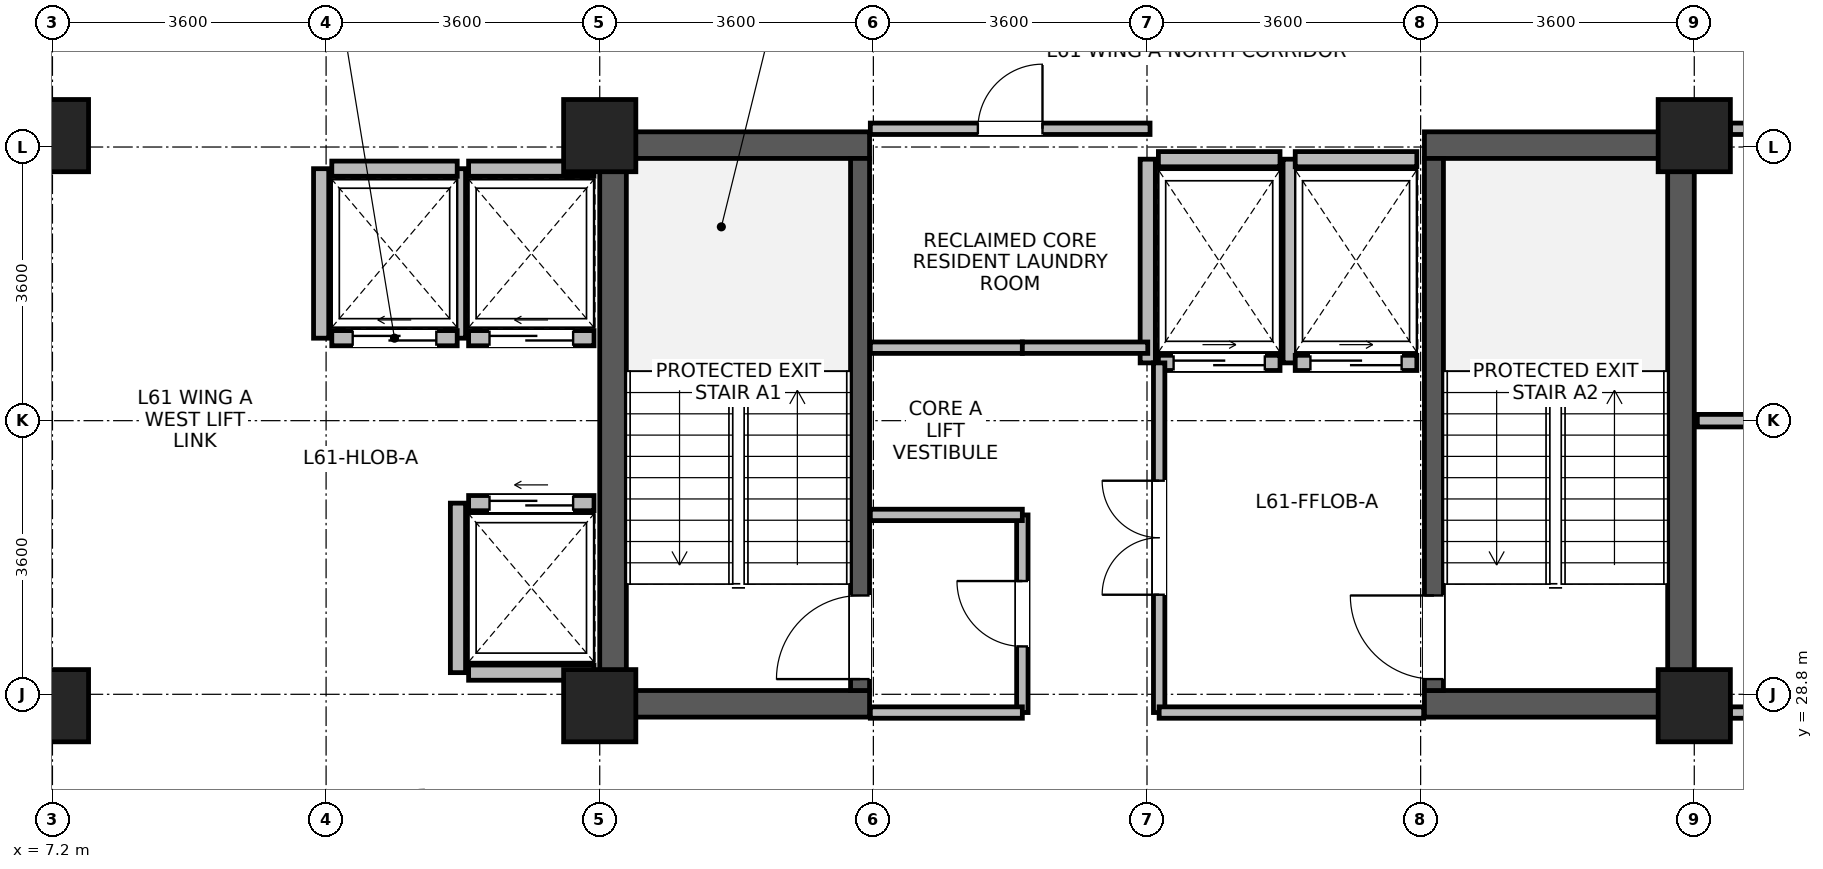
"""IFC4 building model, lengths in metres.
Left out: names, types, materials, properties, quantities, classifications, styles, units other than length and angle.
Written with IfcOpenShell. Run it as: python <this file> out.ifc"""

import sys

from ifc_helpers import new_model, si_unit, direction, frame, frame_2d, origin, origin_2d, place, context, subcontext, project, spatial, rectangle, extrude, source, transform, mapped, element, fill, save


model = new_model("IFC4")
c1 = context("Model", 3, precision=1e-05, world=origin(), true_north=direction((0.0, 1.0)))
c2 = subcontext(c1, "Body", "Model", "MODEL_VIEW")
j1 = project(units=[si_unit("LENGTHUNIT", "METRE"), si_unit("PLANEANGLEUNIT", "RADIAN")], contexts=[c1])
p1 = place(None, origin())
s1 = spatial("IfcSite", under=j1, at=p1, CompositionType="ELEMENT")
p2 = place(p1, origin())
s2 = spatial("IfcBuilding", under=s1, at=p2, CompositionType="ELEMENT")
p3 = place(p2, frame((0.0, 0.0, 238.8)))
s3 = spatial("IfcBuildingStorey", under=s2, at=p3, CompositionType="ELEMENT", Elevation=238.8)
for number, where, z_axis, x_axis in (
    (1, (14.575, 28.5, 0.0), (0.0, 0.0, 1.0), (0.0, 1.0, 0.0)),
    (2, (28.625, 28.5, 0.0), (0.0, 0.0, 1.0), (0.0, 1.0, 0.0)),
):
    element("IfcWall", number, at=place(p3, frame(where, z_axis=z_axis, x_axis=x_axis)), inside=s3, PredefinedType="SHEAR", context=c2, shape_type="SweptSolid", body=[
        extrude(rectangle(XDim=7.7, YDim=0.35, at=frame_2d((3.85, 0.0))), origin(), (0.0, 0.0, 1.0), 3.44),
    ])
for number, where, z_axis, x_axis in (
    (3, (14.75, 28.675, 0.0), (0.0, 0.0, 1.0), (1.0, 0.0, 0.0)),
    (4, (25.25, 28.675, 0.0), (0.0, 0.0, 1.0), (1.0, 0.0, 0.0)),
    (5, (14.75, 36.025, 0.0), (0.0, 0.0, 1.0), (1.0, 0.0, 0.0)),
    (6, (25.25, 36.025, 0.0), (0.0, 0.0, 1.0), (1.0, 0.0, 0.0)),
):
    element("IfcWall", number, at=place(p3, frame(where, z_axis=z_axis, x_axis=x_axis)), inside=s3, PredefinedType="SHEAR", context=c2, shape_type="SweptSolid", body=[
        extrude(rectangle(XDim=3.2, YDim=0.35, at=frame_2d((1.6, 0.0))), origin(), (0.0, 0.0, 1.0), 3.44),
    ])
p4 = place(p3, frame((17.825, 28.85, 0.0), z_axis=(0.0, 0.0, 1.0), x_axis=(0.0, 1.0, 0.0)))
e7 = element("IfcWall", 7, at=p4, inside=s3, PredefinedType="SHEAR", context=c2, shape_type="SweptSolid", body=[
    extrude(rectangle(XDim=7.0, YDim=0.25, at=frame_2d((3.5, 0.0))), origin(), (0.0, 0.0, 1.0), 3.44),
])
p5 = place(p4, frame((0.15, 0.0, 0.0)))
e8 = element("IfcOpeningElement", 8, at=p5, cuts=e7, PredefinedType="OPENING", context=c2, shape_type="SweptSolid", body=[
    extrude(rectangle(XDim=1.1, YDim=2.08, at=frame_2d((0.55, 1.04))), frame((0.0, 0.135, 0.0), z_axis=(0.0, -1.0, 0.0), x_axis=(1.0, 0.0, 0.0)), (0.0, 0.0, 1.0), 0.27),
])
p6 = place(p3, frame((25.375, 28.85, 0.0), z_axis=(0.0, 0.0, 1.0), x_axis=(0.0, 1.0, 0.0)))
e9 = element("IfcWall", 9, at=p6, inside=s3, PredefinedType="SHEAR", context=c2, shape_type="SweptSolid", body=[
    extrude(rectangle(XDim=7.0, YDim=0.25, at=frame_2d((3.5, 0.0))), origin(), (0.0, 0.0, 1.0), 3.44),
])
p7 = place(p6, frame((0.15, 0.0, 0.0)))
e10 = element("IfcOpeningElement", 10, at=p7, cuts=e9, PredefinedType="OPENING", context=c2, shape_type="SweptSolid", body=[
    extrude(rectangle(XDim=1.1, YDim=2.08, at=frame_2d((0.55, 1.04))), frame((0.0, 0.135, 0.0), z_axis=(0.0, -1.0, 0.0), x_axis=(1.0, 0.0, 0.0)), (0.0, 0.0, 1.0), 0.27),
])
m1 = source(origin(), c2, "Body", "SweptSolid", [
    extrude(rectangle(XDim=0.95, YDim=0.95, at=origin_2d()), origin(), (0.0, 0.0, 1.0), 3.7),
])
for number, where, z_axis, x_axis in (
    (11, (7.2, 28.65, 0.0), (0.0, 0.0, 1.0), (1.0, 0.0, 0.0)),
    (12, (7.2, 36.15, 0.0), (0.0, 0.0, 1.0), (1.0, 0.0, 0.0)),
    (13, (14.4, 28.65, 0.0), (0.0, 0.0, 1.0), (1.0, 0.0, 0.0)),
    (14, (14.4, 36.15, 0.0), (0.0, 0.0, 1.0), (1.0, 0.0, 0.0)),
    (15, (28.8, 28.65, 0.0), (0.0, 0.0, 1.0), (1.0, 0.0, 0.0)),
    (16, (28.8, 36.15, 0.0), (0.0, 0.0, 1.0), (1.0, 0.0, 0.0)),
):
    element("IfcColumn", number, at=place(p3, frame(where, z_axis=z_axis, x_axis=x_axis)), inside=s3, PredefinedType="COLUMN", context=c2, shape_type="MappedRepresentation", body=[
        mapped(m1, transform((0.0, 0.0, 0.0), x_axis=(1.0, 0.0, 0.0), y_axis=(0.0, 1.0, 0.0), z_axis=(0.0, 0.0, 1.0), scale=1.0)),
    ])
p8 = place(p3, frame((12.675, 33.485, 0.0), z_axis=(0.0, 0.0, 1.0), x_axis=(1.0, 0.0, 0.0)))
e17 = element("IfcWall", 17, at=p8, inside=s3, PredefinedType="PARTITIONING", context=c2, shape_type="SweptSolid", body=[
    extrude(rectangle(XDim=1.65, YDim=0.2, at=frame_2d((0.825, 0.0))), origin(), (0.0, 0.0, 1.0), 3.42),
])
p9 = place(p8, frame((0.275, 0.0, 0.0)))
e18 = element("IfcOpeningElement", 18, at=p9, cuts=e17, PredefinedType="OPENING", context=c2, shape_type="SweptSolid", body=[
    extrude(rectangle(XDim=1.1, YDim=2.12, at=frame_2d((0.55, 1.06))), frame((0.0, 0.11, 0.0), z_axis=(0.0, -1.0, 0.0), x_axis=(1.0, 0.0, 0.0)), (0.0, 0.0, 1.0), 0.22),
])
p10 = place(p3, frame((12.675, 35.715, 0.0), z_axis=(0.0, 0.0, 1.0), x_axis=(1.0, 0.0, 0.0)))
e19 = element("IfcWall", 19, at=p10, inside=s3, PredefinedType="PARTITIONING", context=c2, shape_type="SweptSolid", body=[
    extrude(rectangle(XDim=1.65, YDim=0.2, at=frame_2d((0.825, 0.0))), origin(), (0.0, 0.0, 1.0), 3.42),
])
p11 = place(p3, frame((12.535, 33.485, 0.0), z_axis=(0.0, 0.0, 1.0), x_axis=(0.0, 1.0, 0.0)))
e20 = element("IfcWall", 20, at=p11, inside=s3, PredefinedType="PARTITIONING", context=c2, shape_type="SweptSolid", body=[
    extrude(rectangle(XDim=2.23, YDim=0.2, at=frame_2d((1.115, 0.0))), origin(), (0.0, 0.0, 1.0), 3.42),
])
p12 = place(p3, frame((12.675, 29.085, 0.0), z_axis=(0.0, 0.0, 1.0), x_axis=(1.0, 0.0, 0.0)))
e21 = element("IfcWall", 21, at=p12, inside=s3, PredefinedType="PARTITIONING", context=c2, shape_type="SweptSolid", body=[
    extrude(rectangle(XDim=1.65, YDim=0.2, at=frame_2d((0.825, 0.0))), origin(), (0.0, 0.0, 1.0), 3.42),
])
p13 = place(p3, frame((12.675, 31.315, 0.0), z_axis=(0.0, 0.0, 1.0), x_axis=(1.0, 0.0, 0.0)))
e22 = element("IfcWall", 22, at=p13, inside=s3, PredefinedType="PARTITIONING", context=c2, shape_type="SweptSolid", body=[
    extrude(rectangle(XDim=1.65, YDim=0.2, at=frame_2d((0.825, 0.0))), origin(), (0.0, 0.0, 1.0), 3.42),
])
p14 = place(p13, frame((0.275, 0.0, 0.0)))
e23 = element("IfcOpeningElement", 23, at=p14, cuts=e22, PredefinedType="OPENING", context=c2, shape_type="SweptSolid", body=[
    extrude(rectangle(XDim=1.1, YDim=2.12, at=frame_2d((0.55, 1.06))), frame((0.0, 0.11, 0.0), z_axis=(0.0, -1.0, 0.0), x_axis=(1.0, 0.0, 0.0)), (0.0, 0.0, 1.0), 0.22),
])
p15 = place(p3, frame((12.535, 29.085, 0.0), z_axis=(0.0, 0.0, 1.0), x_axis=(0.0, 1.0, 0.0)))
e24 = element("IfcWall", 24, at=p15, inside=s3, PredefinedType="PARTITIONING", context=c2, shape_type="SweptSolid", body=[
    extrude(rectangle(XDim=2.23, YDim=0.2, at=frame_2d((1.115, 0.0))), origin(), (0.0, 0.0, 1.0), 3.42),
])
p16 = place(p3, frame((10.875, 33.485, 0.0), z_axis=(0.0, 0.0, 1.0), x_axis=(1.0, 0.0, 0.0)))
e25 = element("IfcWall", 25, at=p16, inside=s3, PredefinedType="PARTITIONING", context=c2, shape_type="SweptSolid", body=[
    extrude(rectangle(XDim=1.65, YDim=0.2, at=frame_2d((0.825, 0.0))), origin(), (0.0, 0.0, 1.0), 3.42),
])
p17 = place(p16, frame((0.275, 0.0, 0.0)))
e26 = element("IfcOpeningElement", 26, at=p17, cuts=e25, PredefinedType="OPENING", context=c2, shape_type="SweptSolid", body=[
    extrude(rectangle(XDim=1.1, YDim=2.12, at=frame_2d((0.55, 1.06))), frame((0.0, 0.11, 0.0), z_axis=(0.0, -1.0, 0.0), x_axis=(1.0, 0.0, 0.0)), (0.0, 0.0, 1.0), 0.22),
])
p18 = place(p3, frame((10.875, 35.715, 0.0), z_axis=(0.0, 0.0, 1.0), x_axis=(1.0, 0.0, 0.0)))
e27 = element("IfcWall", 27, at=p18, inside=s3, PredefinedType="PARTITIONING", context=c2, shape_type="SweptSolid", body=[
    extrude(rectangle(XDim=1.65, YDim=0.2, at=frame_2d((0.825, 0.0))), origin(), (0.0, 0.0, 1.0), 3.42),
])
p19 = place(p3, frame((10.735, 33.485, 0.0), z_axis=(0.0, 0.0, 1.0), x_axis=(0.0, 1.0, 0.0)))
e28 = element("IfcWall", 28, at=p19, inside=s3, PredefinedType="PARTITIONING", context=c2, shape_type="SweptSolid", body=[
    extrude(rectangle(XDim=2.23, YDim=0.2, at=frame_2d((1.115, 0.0))), origin(), (0.0, 0.0, 1.0), 3.42),
])
p20 = place(p3, frame((21.75, 33.16, 0.0), z_axis=(0.0, 0.0, 1.0), x_axis=(1.0, 0.0, 0.0)))
e29 = element("IfcWall", 29, at=p20, inside=s3, PredefinedType="PARTITIONING", context=c2, shape_type="SweptSolid", body=[
    extrude(rectangle(XDim=1.6, YDim=0.2, at=frame_2d((0.8, 0.0))), origin(), (0.0, 0.0, 1.0), 3.42),
])
p21 = place(p20, frame((0.2, 0.0, 0.0)))
e30 = element("IfcOpeningElement", 30, at=p21, cuts=e29, PredefinedType="OPENING", context=c2, shape_type="SweptSolid", body=[
    extrude(rectangle(XDim=1.2, YDim=2.12, at=frame_2d((0.6, 1.06))), frame((0.0, 0.11, 0.0), z_axis=(0.0, -1.0, 0.0), x_axis=(1.0, 0.0, 0.0)), (0.0, 0.0, 1.0), 0.22),
])
p22 = place(p3, frame((21.75, 35.84, 0.0), z_axis=(0.0, 0.0, 1.0), x_axis=(1.0, 0.0, 0.0)))
e31 = element("IfcWall", 31, at=p22, inside=s3, PredefinedType="PARTITIONING", context=c2, shape_type="SweptSolid", body=[
    extrude(rectangle(XDim=1.6, YDim=0.2, at=frame_2d((0.8, 0.0))), origin(), (0.0, 0.0, 1.0), 2.52),
])
for number, where, z_axis, x_axis in (
    (32, (21.61, 33.16, 0.0), (0.0, 0.0, 1.0), (0.0, 1.0, 0.0)),
    (33, (23.49, 33.16, 0.0), (0.0, 0.0, 1.0), (0.0, 1.0, 0.0)),
):
    element("IfcWall", number, at=place(p3, frame(where, z_axis=z_axis, x_axis=x_axis)), inside=s3, PredefinedType="PARTITIONING", context=c2, shape_type="SweptSolid", body=[
        extrude(rectangle(XDim=2.68, YDim=0.2, at=frame_2d((1.34, 0.0))), origin(), (0.0, 0.0, 1.0), 3.42),
    ])
p23 = place(p3, frame((23.55, 33.16, 0.0), z_axis=(0.0, 0.0, 1.0), x_axis=(1.0, 0.0, 0.0)))
e34 = element("IfcWall", 34, at=p23, inside=s3, PredefinedType="PARTITIONING", context=c2, shape_type="SweptSolid", body=[
    extrude(rectangle(XDim=1.6, YDim=0.2, at=frame_2d((0.8, 0.0))), origin(), (0.0, 0.0, 1.0), 3.42),
])
p24 = place(p23, frame((0.2, 0.0, 0.0)))
e35 = element("IfcOpeningElement", 35, at=p24, cuts=e34, PredefinedType="OPENING", context=c2, shape_type="SweptSolid", body=[
    extrude(rectangle(XDim=1.2, YDim=2.12, at=frame_2d((0.6, 1.06))), frame((0.0, 0.11, 0.0), z_axis=(0.0, -1.0, 0.0), x_axis=(1.0, 0.0, 0.0)), (0.0, 0.0, 1.0), 0.22),
])
p25 = place(p3, frame((23.55, 35.84, 0.0), z_axis=(0.0, 0.0, 1.0), x_axis=(1.0, 0.0, 0.0)))
e36 = element("IfcWall", 36, at=p25, inside=s3, PredefinedType="PARTITIONING", context=c2, shape_type="SweptSolid", body=[
    extrude(rectangle(XDim=1.6, YDim=0.2, at=frame_2d((0.8, 0.0))), origin(), (0.0, 0.0, 1.0), 2.52),
])
p26 = place(p3, frame((29.275, 28.56, 0.0), z_axis=(0.0, 0.0, 1.0), x_axis=(1.0, 0.0, 0.0)))
e37 = element("IfcWall", 37, at=p26, inside=s3, PredefinedType="PARTITIONING", context=c2, shape_type="SweptSolid", body=[
    extrude(rectangle(XDim=4.085, YDim=0.15, at=frame_2d((2.042, 0.0))), origin(), (0.0, 0.0, 1.0), 2.87),
])
p27 = place(p26, frame((1.613, 0.0, 0.0)))
e38 = element("IfcOpeningElement", 38, at=p27, cuts=e37, PredefinedType="OPENING", context=c2, shape_type="SweptSolid", body=[
    extrude(rectangle(XDim=0.86, YDim=2.02, at=frame_2d((0.43, 1.01))), frame((0.0, 0.085, 0.0), z_axis=(0.0, -1.0, 0.0), x_axis=(1.0, 0.0, 0.0)), (0.0, 0.0, 1.0), 0.17),
])
p28 = place(p3, frame((29.275, 36.24, 0.0), z_axis=(0.0, 0.0, 1.0), x_axis=(1.0, 0.0, 0.0)))
e39 = element("IfcWall", 39, at=p28, inside=s3, PredefinedType="PARTITIONING", context=c2, shape_type="SweptSolid", body=[
    extrude(rectangle(XDim=4.085, YDim=0.15, at=frame_2d((2.042, 0.0))), origin(), (0.0, 0.0, 1.0), 2.87),
])
p29 = place(p28, frame((1.393, 0.0, 0.0)))
e40 = element("IfcOpeningElement", 40, at=p29, cuts=e39, PredefinedType="OPENING", context=c2, shape_type="SweptSolid", body=[
    extrude(rectangle(XDim=1.3, YDim=2.12, at=frame_2d((0.65, 1.06))), frame((0.0, 0.085, 0.0), z_axis=(0.0, -1.0, 0.0), x_axis=(1.0, 0.0, 0.0)), (0.0, 0.0, 1.0), 0.17),
])
p30 = place(p3, frame((17.96, 36.24, 0.0), z_axis=(0.0, 0.0, 1.0), x_axis=(1.0, 0.0, 0.0)))
e41 = element("IfcWall", 41, at=p30, inside=s3, PredefinedType="PARTITIONING", context=c2, shape_type="SweptSolid", body=[
    extrude(rectangle(XDim=3.68, YDim=0.15, at=frame_2d((1.84, 0.0))), origin(), (0.0, 0.0, 1.0), 2.52),
])
p31 = place(p30, frame((1.415, 0.0, 0.0)))
e42 = element("IfcOpeningElement", 42, at=p31, cuts=e41, PredefinedType="OPENING", context=c2, shape_type="SweptSolid", body=[
    extrude(rectangle(XDim=0.85, YDim=2.04, at=frame_2d((0.425, 1.02))), frame((0.0, 0.085, 0.0), z_axis=(0.0, -1.0, 0.0), x_axis=(1.0, 0.0, 0.0)), (0.0, 0.0, 1.0), 0.17),
])
p32 = place(p3, frame((19.96, 28.56, 0.0), z_axis=(0.0, 0.0, 1.0), x_axis=(0.0, 1.0, 0.0)))
e43 = element("IfcWall", 43, at=p32, inside=s3, PredefinedType="PARTITIONING", context=c2, shape_type="SweptSolid", body=[
    extrude(rectangle(XDim=2.6, YDim=0.15, at=frame_2d((1.3, 0.0))), origin(), (0.0, 0.0, 1.0), 3.42),
])
p33 = place(p32, frame((0.87, 0.0, 0.0)))
e44 = element("IfcOpeningElement", 44, at=p33, cuts=e43, PredefinedType="OPENING", context=c2, shape_type="SweptSolid", body=[
    extrude(rectangle(XDim=0.86, YDim=2.02, at=frame_2d((0.43, 1.01))), frame((0.0, 0.085, 0.0), z_axis=(0.0, -1.0, 0.0), x_axis=(1.0, 0.0, 0.0)), (0.0, 0.0, 1.0), 0.17),
])
p34 = place(p3, frame((17.96, 28.56, 0.0), z_axis=(0.0, 0.0, 1.0), x_axis=(1.0, 0.0, 0.0)))
e45 = element("IfcWall", 45, at=p34, inside=s3, PredefinedType="PARTITIONING", context=c2, shape_type="SweptSolid", body=[
    extrude(rectangle(XDim=2.0, YDim=0.15, at=frame_2d((1.0, 0.0))), origin(), (0.0, 0.0, 1.0), 2.52),
])
for number, where, z_axis, x_axis in (
    (46, (17.96, 31.16, 0.0), (0.0, 0.0, 1.0), (1.0, 0.0, 0.0)),
    (47, (17.96, 33.36, 0.0), (0.0, 0.0, 1.0), (1.0, 0.0, 0.0)),
):
    element("IfcWall", number, at=place(p3, frame(where, z_axis=z_axis, x_axis=x_axis)), inside=s3, PredefinedType="PARTITIONING", context=c2, shape_type="SweptSolid", body=[
        extrude(rectangle(XDim=2.0, YDim=0.15, at=frame_2d((1.0, 0.0))), origin(), (0.0, 0.0, 1.0), 3.42),
    ])
p35 = place(p3, frame((19.96, 33.36, 0.0), z_axis=(0.0, 0.0, 1.0), x_axis=(1.0, 0.0, 0.0)))
e48 = element("IfcWall", 48, at=p35, inside=s3, PredefinedType="PARTITIONING", context=c2, shape_type="SweptSolid", body=[
    extrude(rectangle(XDim=1.65, YDim=0.15, at=frame_2d((0.825, 0.0))), origin(), (0.0, 0.0, 1.0), 3.42),
])
p36 = place(p3, frame((21.76, 28.56, 0.0), z_axis=(0.0, 0.0, 1.0), x_axis=(0.0, 1.0, 0.0)))
e49 = element("IfcWall", 49, at=p36, inside=s3, PredefinedType="PARTITIONING", context=c2, shape_type="SweptSolid", body=[
    extrude(rectangle(XDim=4.6, YDim=0.15, at=frame_2d((2.3, 0.0))), origin(), (0.0, 0.0, 1.0), 3.42),
])
p37 = place(p36, frame((1.55, 0.0, 0.0)))
e50 = element("IfcOpeningElement", 50, at=p37, cuts=e49, PredefinedType="OPENING", context=c2, shape_type="SweptSolid", body=[
    extrude(rectangle(XDim=1.5, YDim=2.1, at=frame_2d((0.75, 1.05))), frame((0.0, 0.085, 0.0), z_axis=(0.0, -1.0, 0.0), x_axis=(1.0, 0.0, 0.0)), (0.0, 0.0, 1.0), 0.17),
])
p38 = place(p3, frame((28.84, 32.4, 0.0), z_axis=(0.0, 0.0, 1.0), x_axis=(1.0, 0.0, 0.0)))
e51 = element("IfcWall", 51, at=p38, inside=s3, PredefinedType="PARTITIONING", context=c2, shape_type="SweptSolid", body=[
    extrude(rectangle(XDim=4.52, YDim=0.165, at=frame_2d((2.26, 0.0))), origin(), (0.0, 0.0, 1.0), 3.42),
])
p39 = place(p3, frame((21.76, 28.56, 0.0), z_axis=(0.0, 0.0, 1.0), x_axis=(1.0, 0.0, 0.0)))
e52 = element("IfcWall", 52, at=p39, inside=s3, PredefinedType="PARTITIONING", context=c2, shape_type="SweptSolid", body=[
    extrude(rectangle(XDim=3.48, YDim=0.15, at=frame_2d((1.74, 0.0))), origin(), (0.0, 0.0, 1.0), 2.52),
])
p40 = place(p5, origin())
e53 = element("IfcDoor", 53, at=p40, inside=s3, OperationType="SINGLE_SWING_LEFT", PredefinedType="DOOR", context=c2, shape_type="SweptSolid", body=[
    extrude(rectangle(XDim=1.1, YDim=2.08, at=frame_2d((0.55, 1.04))), frame((0.0, 0.025, 0.0), z_axis=(0.0, -1.0, 0.0), x_axis=(1.0, 0.0, 0.0)), (0.0, 0.0, 1.0), 0.05),
])
fill(e8, e53)
p41 = place(p7, origin())
e54 = element("IfcDoor", 54, at=p41, inside=s3, OperationType="SINGLE_SWING_RIGHT", PredefinedType="DOOR", context=c2, shape_type="SweptSolid", body=[
    extrude(rectangle(XDim=1.1, YDim=2.08, at=frame_2d((0.55, 1.04))), frame((0.0, 0.025, 0.0), z_axis=(0.0, -1.0, 0.0), x_axis=(1.0, 0.0, 0.0)), (0.0, 0.0, 1.0), 0.05),
])
fill(e10, e54)
p42 = place(p9, origin())
e55 = element("IfcDoor", 55, at=p42, inside=s3, OperationType="SLIDING_TO_LEFT", PredefinedType="DOOR", context=c2, shape_type="SweptSolid", body=[
    extrude(rectangle(XDim=1.1, YDim=2.12, at=frame_2d((0.55, 1.06))), frame((0.0, 0.025, 0.0), z_axis=(0.0, -1.0, 0.0), x_axis=(1.0, 0.0, 0.0)), (0.0, 0.0, 1.0), 0.05),
])
fill(e18, e55)
p43 = place(p14, origin())
e56 = element("IfcDoor", 56, at=p43, inside=s3, OperationType="SLIDING_TO_LEFT", PredefinedType="DOOR", context=c2, shape_type="SweptSolid", body=[
    extrude(rectangle(XDim=1.1, YDim=2.12, at=frame_2d((0.55, 1.06))), frame((0.0, 0.025, 0.0), z_axis=(0.0, -1.0, 0.0), x_axis=(1.0, 0.0, 0.0)), (0.0, 0.0, 1.0), 0.05),
])
fill(e23, e56)
p44 = place(p17, origin())
e57 = element("IfcDoor", 57, at=p44, inside=s3, OperationType="SLIDING_TO_LEFT", PredefinedType="DOOR", context=c2, shape_type="SweptSolid", body=[
    extrude(rectangle(XDim=1.1, YDim=2.12, at=frame_2d((0.55, 1.06))), frame((0.0, 0.025, 0.0), z_axis=(0.0, -1.0, 0.0), x_axis=(1.0, 0.0, 0.0)), (0.0, 0.0, 1.0), 0.05),
])
fill(e26, e57)
p45 = place(p21, origin())
e58 = element("IfcDoor", 58, at=p45, inside=s3, OperationType="SLIDING_TO_RIGHT", PredefinedType="DOOR", context=c2, shape_type="SweptSolid", body=[
    extrude(rectangle(XDim=1.2, YDim=2.12, at=frame_2d((0.6, 1.06))), frame((0.0, 0.025, 0.0), z_axis=(0.0, -1.0, 0.0), x_axis=(1.0, 0.0, 0.0)), (0.0, 0.0, 1.0), 0.05),
])
fill(e30, e58)
p46 = place(p24, origin())
e59 = element("IfcDoor", 59, at=p46, inside=s3, OperationType="SLIDING_TO_RIGHT", PredefinedType="DOOR", context=c2, shape_type="SweptSolid", body=[
    extrude(rectangle(XDim=1.2, YDim=2.12, at=frame_2d((0.6, 1.06))), frame((0.0, 0.025, 0.0), z_axis=(0.0, -1.0, 0.0), x_axis=(1.0, 0.0, 0.0)), (0.0, 0.0, 1.0), 0.05),
])
fill(e35, e59)
p47 = place(p31, origin())
e60 = element("IfcDoor", 60, at=p47, inside=s3, OperationType="SINGLE_SWING_RIGHT", PredefinedType="DOOR", context=c2, shape_type="SweptSolid", body=[
    extrude(rectangle(XDim=0.85, YDim=2.04, at=frame_2d((0.425, 1.02))), frame((0.0, 0.025, 0.0), z_axis=(0.0, -1.0, 0.0), x_axis=(1.0, 0.0, 0.0)), (0.0, 0.0, 1.0), 0.05),
])
fill(e42, e60)
p48 = place(p33, origin())
e61 = element("IfcDoor", 61, at=p48, inside=s3, OperationType="SINGLE_SWING_RIGHT", PredefinedType="DOOR", context=c2, shape_type="SweptSolid", body=[
    extrude(rectangle(XDim=0.86, YDim=2.02, at=frame_2d((0.43, 1.01))), frame((0.0, 0.025, 0.0), z_axis=(0.0, -1.0, 0.0), x_axis=(1.0, 0.0, 0.0)), (0.0, 0.0, 1.0), 0.05),
])
fill(e44, e61)
p49 = place(p37, origin())
e62 = element("IfcDoor", 62, at=p49, inside=s3, OperationType="DOUBLE_DOOR_SINGLE_SWING", PredefinedType="DOOR", context=c2, shape_type="SweptSolid", body=[
    extrude(rectangle(XDim=1.5, YDim=2.1, at=frame_2d((0.75, 1.05))), frame((0.0, 0.025, 0.0), z_axis=(0.0, -1.0, 0.0), x_axis=(1.0, 0.0, 0.0)), (0.0, 0.0, 1.0), 0.05),
])
fill(e50, e62)
save(model, sys.argv[1])
